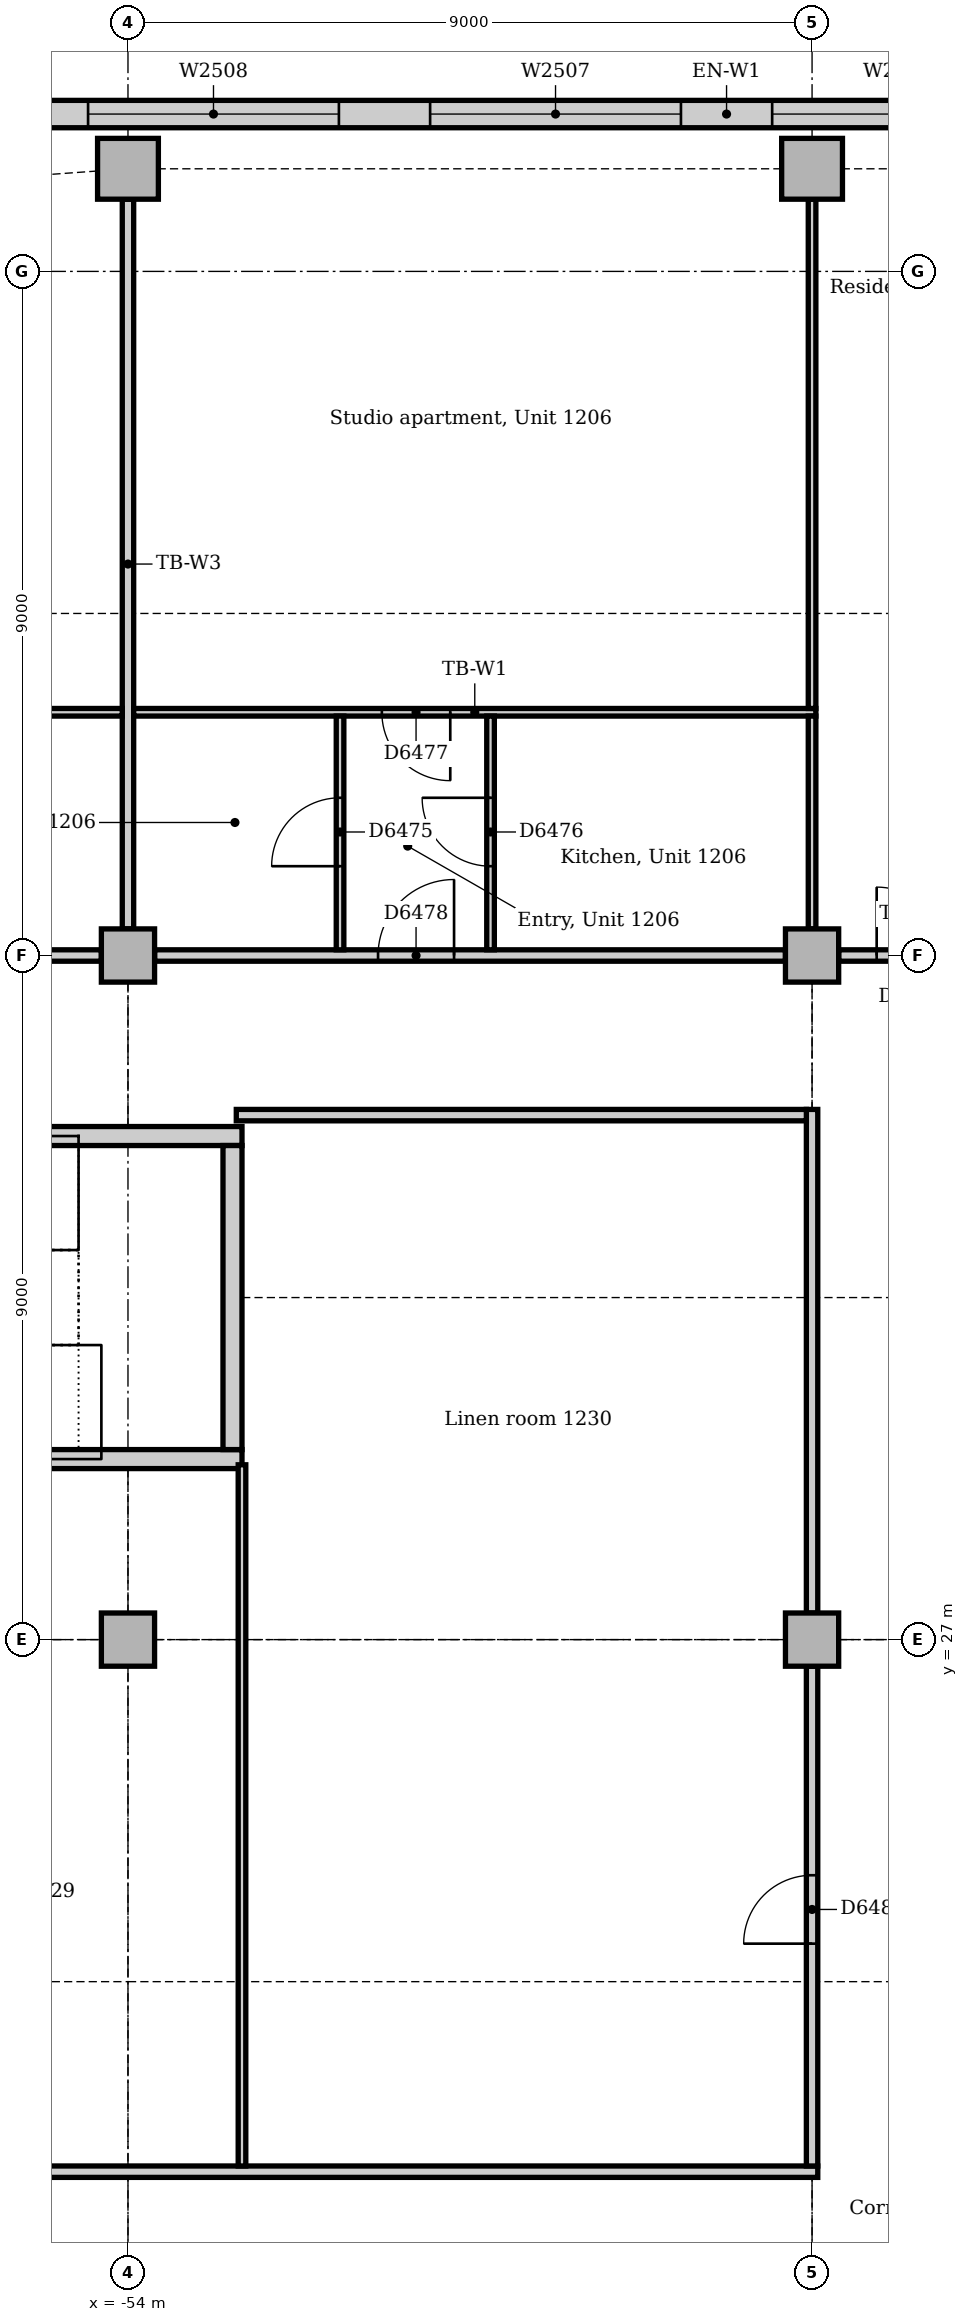
"""IFC4 building model, lengths in metres.
Left out: names, types, materials, properties, quantities, classifications, styles, units other than length and angle.
Written with IfcOpenShell. Run it as: python <this file> out.ifc"""

import sys

from ifc_helpers import new_model, si_unit, direction, frame, frame_2d, origin, origin_2d, place, context, subcontext, project, spatial, rectangle, extrude, element, fill, save


model = new_model("IFC4")
c1 = context("Model", 3, precision=1e-05, world=origin(), true_north=direction((0.0, 1.0)))
c2 = subcontext(c1, "Body", "Model", "MODEL_VIEW")
j1 = project(units=[si_unit("LENGTHUNIT", "METRE"), si_unit("PLANEANGLEUNIT", "RADIAN")], contexts=[c1])
p1 = place(None, origin())
s1 = spatial("IfcSite", under=j1, at=p1, CompositionType="ELEMENT")
p2 = place(p1, origin())
s2 = spatial("IfcBuilding", under=s1, at=p2, CompositionType="ELEMENT")
p3 = place(p2, frame((0.0, 0.0, 55.0)))
s3 = spatial("IfcBuildingStorey", under=s2, at=p3, CompositionType="ELEMENT", Elevation=55.0)
p4 = place(p3, frame((-60.0, 29.375, 0.0), z_axis=(0.0, 0.0, 1.0), x_axis=(1.0, 0.0, 0.0)))
e1 = element("IfcWall", 1, at=p4, inside=s3, PredefinedType="SOLIDWALL", context=c2, shape_type="SweptSolid", body=[
    extrude(rectangle(XDim=7.5, YDim=0.25, at=frame_2d((3.75, 0.0))), origin(), (0.0, 0.0, 1.0), 4.0),
])
p5 = place(p3, frame((-52.5, 33.625, 0.0), z_axis=(0.0, 0.0, 1.0), x_axis=(-1.0, 0.0, 0.0)))
e2 = element("IfcWall", 2, at=p5, inside=s3, PredefinedType="SOLIDWALL", context=c2, shape_type="SweptSolid", body=[
    extrude(rectangle(XDim=7.5, YDim=0.25, at=frame_2d((3.75, 0.0))), origin(), (0.0, 0.0, 1.0), 4.0),
])
p6 = place(p5, frame((6.0, 0.0, 0.0)))
e3 = element("IfcOpeningElement", 3, at=p6, cuts=e2, PredefinedType="OPENING", context=c2, shape_type="SweptSolid", body=[
    extrude(rectangle(XDim=1.0, YDim=2.1, at=frame_2d((0.5, 1.05))), frame((0.0, 0.135, 0.0), z_axis=(0.0, -1.0, 0.0), x_axis=(1.0, 0.0, 0.0)), (0.0, 0.0, 1.0), 0.27),
])
p7 = place(p3, frame((-52.625, 29.5, 0.0), z_axis=(0.0, 0.0, 1.0), x_axis=(0.0, 1.0, 0.0)))
e4 = element("IfcWall", 4, at=p7, inside=s3, PredefinedType="SOLIDWALL", context=c2, shape_type="SweptSolid", body=[
    extrude(rectangle(XDim=4.0, YDim=0.25, at=frame_2d((2.0, 0.0))), origin(), (0.0, 0.0, 1.0), 4.0),
])
for number, where, z_axis, x_axis in (
    (5, (-54.0, 46.35, 0.0), (0.0, 0.0, 1.0), (1.0, 0.0, 0.0)),
    (6, (-45.0, 46.35, 0.0), (0.0, 0.0, 1.0), (1.0, 0.0, 0.0)),
):
    element("IfcColumn", number, at=place(p3, frame(where, z_axis=z_axis, x_axis=x_axis)), inside=s3, PredefinedType="COLUMN", context=c2, shape_type="SweptSolid", body=[
        extrude(rectangle(XDim=0.8, YDim=0.8, at=origin_2d()), origin(), (0.0, 0.0, 1.0), 3.85),
    ])
for number, where, z_axis, x_axis in (
    (7, (-54.0, 27.0, 0.0), (0.0, 0.0, 1.0), (1.0, 0.0, 0.0)),
    (8, (-54.0, 36.0, 0.0), (0.0, 0.0, 1.0), (1.0, 0.0, 0.0)),
    (9, (-45.0, 27.0, 0.0), (0.0, 0.0, 1.0), (1.0, 0.0, 0.0)),
    (10, (-45.0, 36.0, 0.0), (0.0, 0.0, 1.0), (1.0, 0.0, 0.0)),
):
    element("IfcColumn", number, at=place(p3, frame(where, z_axis=z_axis, x_axis=x_axis)), inside=s3, PredefinedType="COLUMN", context=c2, shape_type="SweptSolid", body=[
        extrude(rectangle(XDim=0.7, YDim=0.7, at=origin_2d()), origin(), (0.0, 0.0, 1.0), 3.85),
    ])
p8 = place(p3, frame((-31.243, 47.07, 0.0), z_axis=(0.0, 0.0, 1.0), x_axis=(-1.0, 0.0, 0.0)))
e11 = element("IfcWall", 11, at=p8, inside=s3, PredefinedType="STANDARD", context=c2, shape_type="SweptSolid", body=[
    extrude(rectangle(XDim=29.765, YDim=0.36, at=frame_2d((14.882, 0.0))), origin(), (0.0, 0.0, 1.0), 3.85),
])
p9 = place(p8, frame((1.982, 0.0, 0.9)))
e12 = element("IfcOpeningElement", 12, at=p9, cuts=e11, PredefinedType="OPENING", context=c2, shape_type="SweptSolid", body=[
    extrude(rectangle(XDim=3.3, YDim=1.6, at=frame_2d((1.65, 0.8))), frame((0.0, 0.19, 0.0), z_axis=(0.0, -1.0, 0.0), x_axis=(1.0, 0.0, 0.0)), (0.0, 0.0, 1.0), 0.38),
])
p10 = place(p8, frame((6.482, 0.0, 0.9)))
e13 = element("IfcOpeningElement", 13, at=p10, cuts=e11, PredefinedType="OPENING", context=c2, shape_type="SweptSolid", body=[
    extrude(rectangle(XDim=3.3, YDim=1.6, at=frame_2d((1.65, 0.8))), frame((0.0, 0.19, 0.0), z_axis=(0.0, -1.0, 0.0), x_axis=(1.0, 0.0, 0.0)), (0.0, 0.0, 1.0), 0.38),
])
p11 = place(p8, frame((10.982, 0.0, 0.9)))
e14 = element("IfcOpeningElement", 14, at=p11, cuts=e11, PredefinedType="OPENING", context=c2, shape_type="SweptSolid", body=[
    extrude(rectangle(XDim=3.3, YDim=1.6, at=frame_2d((1.65, 0.8))), frame((0.0, 0.19, 0.0), z_axis=(0.0, -1.0, 0.0), x_axis=(1.0, 0.0, 0.0)), (0.0, 0.0, 1.0), 0.38),
])
p12 = place(p8, frame((15.482, 0.0, 0.9)))
e15 = element("IfcOpeningElement", 15, at=p12, cuts=e11, PredefinedType="OPENING", context=c2, shape_type="SweptSolid", body=[
    extrude(rectangle(XDim=3.3, YDim=1.6, at=frame_2d((1.65, 0.8))), frame((0.0, 0.19, 0.0), z_axis=(0.0, -1.0, 0.0), x_axis=(1.0, 0.0, 0.0)), (0.0, 0.0, 1.0), 0.38),
])
p13 = place(p8, frame((19.982, 0.0, 0.9)))
e16 = element("IfcOpeningElement", 16, at=p13, cuts=e11, PredefinedType="OPENING", context=c2, shape_type="SweptSolid", body=[
    extrude(rectangle(XDim=3.3, YDim=1.6, at=frame_2d((1.65, 0.8))), frame((0.0, 0.19, 0.0), z_axis=(0.0, -1.0, 0.0), x_axis=(1.0, 0.0, 0.0)), (0.0, 0.0, 1.0), 0.38),
])
p14 = place(p8, frame((24.482, 0.0, 0.9)))
e17 = element("IfcOpeningElement", 17, at=p14, cuts=e11, PredefinedType="OPENING", context=c2, shape_type="SweptSolid", body=[
    extrude(rectangle(XDim=3.3, YDim=1.6, at=frame_2d((1.65, 0.8))), frame((0.0, 0.19, 0.0), z_axis=(0.0, -1.0, 0.0), x_axis=(1.0, 0.0, 0.0)), (0.0, 0.0, 1.0), 0.38),
])
p15 = place(p3, frame((-44.65, 36.0, 0.0), z_axis=(0.0, 0.0, 1.0), x_axis=(1.0, 0.0, 0.0)))
e18 = element("IfcWall", 18, at=p15, inside=s3, PredefinedType="PARTITIONING", context=c2, shape_type="SweptSolid", body=[
    extrude(rectangle(XDim=1.925, YDim=0.15, at=frame_2d((0.963, 0.0))), origin(), (0.0, 0.0, 1.0), 3.602),
])
p16 = place(p15, frame((0.5, 0.0, 0.0)))
e19 = element("IfcOpeningElement", 19, at=p16, cuts=e18, PredefinedType="OPENING", context=c2, shape_type="SweptSolid", body=[
    extrude(rectangle(XDim=0.9, YDim=2.1, at=frame_2d((0.45, 1.05))), frame((0.0, 0.085, 0.0), z_axis=(0.0, -1.0, 0.0), x_axis=(1.0, 0.0, 0.0)), (0.0, 0.0, 1.0), 0.17),
])
p17 = place(p3, frame((-53.65, 36.0, 0.0), z_axis=(0.0, 0.0, 1.0), x_axis=(1.0, 0.0, 0.0)))
e20 = element("IfcWall", 20, at=p17, inside=s3, PredefinedType="PARTITIONING", context=c2, shape_type="SweptSolid", body=[
    extrude(rectangle(XDim=8.3, YDim=0.15, at=frame_2d((4.15, 0.0))), origin(), (0.0, 0.0, 1.0), 3.158),
])
p18 = place(p17, frame((2.94, 0.0, 0.0)))
e21 = element("IfcOpeningElement", 21, at=p18, cuts=e20, PredefinedType="OPENING", context=c2, shape_type="SweptSolid", body=[
    extrude(rectangle(XDim=1.0, YDim=2.1, at=frame_2d((0.5, 1.05))), frame((0.0, 0.085, 0.0), z_axis=(0.0, -1.0, 0.0), x_axis=(1.0, 0.0, 0.0)), (0.0, 0.0, 1.0), 0.17),
])
p19 = place(p3, frame((-62.6, 36.0, 0.0), z_axis=(0.0, 0.0, 1.0), x_axis=(1.0, 0.0, 0.0)))
e22 = element("IfcWall", 22, at=p19, inside=s3, PredefinedType="PARTITIONING", context=c2, shape_type="SweptSolid", body=[
    extrude(rectangle(XDim=8.25, YDim=0.15, at=frame_2d((4.125, 0.0))), origin(), (0.0, 0.0, 1.0), 3.158),
])
p20 = place(p19, frame((1.786, 0.0, 0.0)))
e23 = element("IfcOpeningElement", 23, at=p20, cuts=e22, PredefinedType="OPENING", context=c2, shape_type="SweptSolid", body=[
    extrude(rectangle(XDim=1.0, YDim=2.1, at=frame_2d((0.5, 1.05))), frame((0.0, 0.085, 0.0), z_axis=(0.0, -1.0, 0.0), x_axis=(1.0, 0.0, 0.0)), (0.0, 0.0, 1.0), 0.17),
])
p21 = place(p3, frame((-64.89, 20.0, 0.0), z_axis=(0.0, 0.0, 1.0), x_axis=(1.0, 0.0, 0.0)))
e24 = element("IfcWall", 24, at=p21, inside=s3, PredefinedType="PARTITIONING", context=c2, shape_type="SweptSolid", body=[
    extrude(rectangle(XDim=19.965, YDim=0.15, at=frame_2d((9.982, 0.0))), origin(), (0.0, 0.0, 1.0), 3.85),
])
p22 = place(p21, frame((2.05, 0.0, 0.0)))
e25 = element("IfcOpeningElement", 25, at=p22, cuts=e24, PredefinedType="OPENING", context=c2, shape_type="SweptSolid", body=[
    extrude(rectangle(XDim=0.9, YDim=2.1, at=frame_2d((0.45, 1.05))), frame((0.0, 0.085, 0.0), z_axis=(0.0, -1.0, 0.0), x_axis=(1.0, 0.0, 0.0)), (0.0, 0.0, 1.0), 0.17),
])
p23 = place(p21, frame((8.19, 0.0, 0.0)))
e26 = element("IfcOpeningElement", 26, at=p23, cuts=e24, PredefinedType="OPENING", context=c2, shape_type="SweptSolid", body=[
    extrude(rectangle(XDim=0.9, YDim=2.1, at=frame_2d((0.45, 1.05))), frame((0.0, 0.085, 0.0), z_axis=(0.0, -1.0, 0.0), x_axis=(1.0, 0.0, 0.0)), (0.0, 0.0, 1.0), 0.17),
])
p24 = place(p3, frame((-45.0, 20.075, 0.0), z_axis=(0.0, 0.0, 1.0), x_axis=(0.0, 1.0, 0.0)))
e27 = element("IfcWall", 27, at=p24, inside=s3, PredefinedType="PARTITIONING", context=c2, shape_type="SweptSolid", body=[
    extrude(rectangle(XDim=6.575, YDim=0.15, at=frame_2d((3.288, 0.0))), origin(), (0.0, 0.0, 1.0), 3.256),
])
p25 = place(p24, frame((2.925, 0.0, 0.0)))
e28 = element("IfcOpeningElement", 28, at=p25, cuts=e27, PredefinedType="OPENING", context=c2, shape_type="SweptSolid", body=[
    extrude(rectangle(XDim=0.9, YDim=2.1, at=frame_2d((0.45, 1.05))), frame((0.0, 0.085, 0.0), z_axis=(0.0, -1.0, 0.0), x_axis=(1.0, 0.0, 0.0)), (0.0, 0.0, 1.0), 0.17),
])
p26 = place(p3, frame((-45.0, 27.35, 0.0), z_axis=(0.0, 0.0, 1.0), x_axis=(0.0, 1.0, 0.0)))
e29 = element("IfcWall", 29, at=p26, inside=s3, PredefinedType="PARTITIONING", context=c2, shape_type="SweptSolid", body=[
    extrude(rectangle(XDim=6.625, YDim=0.15, at=frame_2d((3.312, 0.0))), origin(), (0.0, 0.0, 1.0), 3.256),
])
p27 = place(p3, frame((-52.575, 33.9, 0.0), z_axis=(0.0, 0.0, 1.0), x_axis=(1.0, 0.0, 0.0)))
e30 = element("IfcWall", 30, at=p27, inside=s3, PredefinedType="PARTITIONING", context=c2, shape_type="SweptSolid", body=[
    extrude(rectangle(XDim=7.5, YDim=0.15, at=frame_2d((3.75, 0.0))), origin(), (0.0, 0.0, 1.0), 3.85),
])
p28 = place(p3, frame((-54.0, 36.35, 0.0), z_axis=(0.0, 0.0, 1.0), x_axis=(0.0, 1.0, 0.0)))
e31 = element("IfcWall", 31, at=p28, inside=s3, PredefinedType="PARTITIONING", context=c2, shape_type="SweptSolid", body=[
    extrude(rectangle(XDim=9.6, YDim=0.15, at=frame_2d((4.8, 0.0))), origin(), (0.0, 0.0, 1.0), 3.256),
])
p29 = place(p3, frame((-53.925, 39.2, 0.0), z_axis=(0.0, 0.0, 1.0), x_axis=(1.0, 0.0, 0.0)))
e32 = element("IfcWall", 32, at=p29, inside=s3, PredefinedType="PARTITIONING", context=c2, shape_type="SweptSolid", body=[
    extrude(rectangle(XDim=8.975, YDim=0.1, at=frame_2d((4.487, 0.0))), origin(), (0.0, 0.0, 1.0), 3.85),
])
p30 = place(p29, frame((3.265, 0.0, 0.0)))
e33 = element("IfcOpeningElement", 33, at=p30, cuts=e32, PredefinedType="OPENING", context=c2, shape_type="SweptSolid", body=[
    extrude(rectangle(XDim=0.9, YDim=2.1, at=frame_2d((0.45, 1.05))), frame((0.0, 0.06, 0.0), z_axis=(0.0, -1.0, 0.0), x_axis=(1.0, 0.0, 0.0)), (0.0, 0.0, 1.0), 0.12),
])
p31 = place(p3, frame((-64.89, 39.2, 0.0), z_axis=(0.0, 0.0, 1.0), x_axis=(1.0, 0.0, 0.0)))
e34 = element("IfcWall", 34, at=p31, inside=s3, PredefinedType="PARTITIONING", context=c2, shape_type="SweptSolid", body=[
    extrude(rectangle(XDim=10.815, YDim=0.1, at=frame_2d((5.407, 0.0))), origin(), (0.0, 0.0, 1.0), 3.85),
])
p32 = place(p31, frame((4.126, 0.0, 0.0)))
e35 = element("IfcOpeningElement", 35, at=p32, cuts=e34, PredefinedType="OPENING", context=c2, shape_type="SweptSolid", body=[
    extrude(rectangle(XDim=0.9, YDim=2.1, at=frame_2d((0.45, 1.05))), frame((0.0, 0.06, 0.0), z_axis=(0.0, -1.0, 0.0), x_axis=(1.0, 0.0, 0.0)), (0.0, 0.0, 1.0), 0.12),
])
p33 = place(p3, frame((-45.0, 39.25, 0.0), z_axis=(0.0, 0.0, 1.0), x_axis=(0.0, 1.0, 0.0)))
e36 = element("IfcWall", 36, at=p33, inside=s3, PredefinedType="PARTITIONING", context=c2, shape_type="SweptSolid", body=[
    extrude(rectangle(XDim=6.7, YDim=0.1, at=frame_2d((3.35, 0.0))), origin(), (0.0, 0.0, 1.0), 3.256),
])
p34 = place(p3, frame((-45.0, 36.35, 0.0), z_axis=(0.0, 0.0, 1.0), x_axis=(0.0, 1.0, 0.0)))
e37 = element("IfcWall", 37, at=p34, inside=s3, PredefinedType="PARTITIONING", context=c2, shape_type="SweptSolid", body=[
    extrude(rectangle(XDim=2.8, YDim=0.1, at=frame_2d((1.4, 0.0))), origin(), (0.0, 0.0, 1.0), 3.256),
])
p35 = place(p3, frame((-52.5, 20.075, 0.0), z_axis=(0.0, 0.0, 1.0), x_axis=(0.0, 1.0, 0.0)))
e38 = element("IfcWall", 38, at=p35, inside=s3, PredefinedType="PARTITIONING", context=c2, shape_type="SweptSolid", body=[
    extrude(rectangle(XDim=9.225, YDim=0.1, at=frame_2d((4.612, 0.0))), origin(), (0.0, 0.0, 1.0), 3.85),
])
p36 = place(p3, frame((-51.21, 36.075, 0.0), z_axis=(0.0, 0.0, 1.0), x_axis=(0.0, 1.0, 0.0)))
e39 = element("IfcWall", 39, at=p36, inside=s3, PredefinedType="PARTITIONING", context=c2, shape_type="SweptSolid", body=[
    extrude(rectangle(XDim=3.075, YDim=0.1, at=frame_2d((1.538, 0.0))), origin(), (0.0, 0.0, 1.0), 3.85),
])
p37 = place(p36, frame((1.1, 0.0, 0.0)))
e40 = element("IfcOpeningElement", 40, at=p37, cuts=e39, PredefinedType="OPENING", context=c2, shape_type="SweptSolid", body=[
    extrude(rectangle(XDim=0.9, YDim=2.1, at=frame_2d((0.45, 1.05))), frame((0.0, 0.06, 0.0), z_axis=(0.0, -1.0, 0.0), x_axis=(1.0, 0.0, 0.0)), (0.0, 0.0, 1.0), 0.12),
])
p38 = place(p3, frame((-49.23, 36.075, 0.0), z_axis=(0.0, 0.0, 1.0), x_axis=(0.0, 1.0, 0.0)))
e41 = element("IfcWall", 41, at=p38, inside=s3, PredefinedType="PARTITIONING", context=c2, shape_type="SweptSolid", body=[
    extrude(rectangle(XDim=3.075, YDim=0.1, at=frame_2d((1.538, 0.0))), origin(), (0.0, 0.0, 1.0), 3.85),
])
p39 = place(p38, frame((1.1, 0.0, 0.0)))
e42 = element("IfcOpeningElement", 42, at=p39, cuts=e41, PredefinedType="OPENING", context=c2, shape_type="SweptSolid", body=[
    extrude(rectangle(XDim=0.9, YDim=2.1, at=frame_2d((0.45, 1.05))), frame((0.0, 0.06, 0.0), z_axis=(0.0, -1.0, 0.0), x_axis=(1.0, 0.0, 0.0)), (0.0, 0.0, 1.0), 0.12),
])
p40 = place(p11, origin())
e43 = element("IfcWindow", 43, at=p40, inside=s3, PartitioningType="SINGLE_PANEL", PredefinedType="WINDOW", context=c2, shape_type="SweptSolid", body=[
    extrude(rectangle(XDim=3.3, YDim=1.6, at=frame_2d((1.65, 0.8))), frame((0.0, 0.13, 0.0), z_axis=(0.0, -1.0, 0.0), x_axis=(1.0, 0.0, 0.0)), (0.0, 0.0, 1.0), 0.06),
])
fill(e14, e43)
p41 = place(p12, origin())
e44 = element("IfcWindow", 44, at=p41, inside=s3, PartitioningType="SINGLE_PANEL", PredefinedType="WINDOW", context=c2, shape_type="SweptSolid", body=[
    extrude(rectangle(XDim=3.3, YDim=1.6, at=frame_2d((1.65, 0.8))), frame((0.0, 0.13, 0.0), z_axis=(0.0, -1.0, 0.0), x_axis=(1.0, 0.0, 0.0)), (0.0, 0.0, 1.0), 0.06),
])
fill(e15, e44)
p42 = place(p13, origin())
e45 = element("IfcWindow", 45, at=p42, inside=s3, PartitioningType="SINGLE_PANEL", PredefinedType="WINDOW", context=c2, shape_type="SweptSolid", body=[
    extrude(rectangle(XDim=3.3, YDim=1.6, at=frame_2d((1.65, 0.8))), frame((0.0, 0.13, 0.0), z_axis=(0.0, -1.0, 0.0), x_axis=(1.0, 0.0, 0.0)), (0.0, 0.0, 1.0), 0.06),
])
fill(e16, e45)
p43 = place(p16, origin())
e46 = element("IfcDoor", 46, at=p43, inside=s3, OperationType="SINGLE_SWING_LEFT", PredefinedType="DOOR", context=c2, shape_type="SweptSolid", body=[
    extrude(rectangle(XDim=0.9, YDim=2.1, at=frame_2d((0.45, 1.05))), frame((0.0, 0.025, 0.0), z_axis=(0.0, -1.0, 0.0), x_axis=(1.0, 0.0, 0.0)), (0.0, 0.0, 1.0), 0.05),
])
fill(e19, e46)
p44 = place(p37, origin())
e47 = element("IfcDoor", 47, at=p44, inside=s3, OperationType="SINGLE_SWING_LEFT", PredefinedType="DOOR", context=c2, shape_type="SweptSolid", body=[
    extrude(rectangle(XDim=0.9, YDim=2.1, at=frame_2d((0.45, 1.05))), frame((0.0, 0.025, 0.0), z_axis=(0.0, -1.0, 0.0), x_axis=(1.0, 0.0, 0.0)), (0.0, 0.0, 1.0), 0.05),
])
fill(e40, e47)
p45 = place(p39, origin())
e48 = element("IfcDoor", 48, at=p45, inside=s3, OperationType="SINGLE_SWING_RIGHT", PredefinedType="DOOR", context=c2, shape_type="SweptSolid", body=[
    extrude(rectangle(XDim=0.9, YDim=2.1, at=frame_2d((0.45, 1.05))), frame((0.0, 0.025, 0.0), z_axis=(0.0, -1.0, 0.0), x_axis=(1.0, 0.0, 0.0)), (0.0, 0.0, 1.0), 0.05),
])
fill(e42, e48)
p46 = place(p30, frame((0.9, 0.0, 0.0), z_axis=(0.0, 0.0, 1.0), x_axis=(-1.0, 0.0, 0.0)))
e49 = element("IfcDoor", 49, at=p46, inside=s3, OperationType="SINGLE_SWING_LEFT", PredefinedType="DOOR", context=c2, shape_type="SweptSolid", body=[
    extrude(rectangle(XDim=0.9, YDim=2.1, at=frame_2d((0.45, 1.05))), frame((0.0, 0.025, 0.0), z_axis=(0.0, -1.0, 0.0), x_axis=(1.0, 0.0, 0.0)), (0.0, 0.0, 1.0), 0.05),
])
fill(e33, e49)
p47 = place(p18, origin())
e50 = element("IfcDoor", 50, at=p47, inside=s3, OperationType="SINGLE_SWING_RIGHT", PredefinedType="DOOR", context=c2, shape_type="SweptSolid", body=[
    extrude(rectangle(XDim=1.0, YDim=2.1, at=frame_2d((0.5, 1.05))), frame((0.0, 0.025, 0.0), z_axis=(0.0, -1.0, 0.0), x_axis=(1.0, 0.0, 0.0)), (0.0, 0.0, 1.0), 0.05),
])
fill(e21, e50)
p48 = place(p25, origin())
e51 = element("IfcDoor", 51, at=p48, inside=s3, OperationType="SINGLE_SWING_LEFT", PredefinedType="DOOR", context=c2, shape_type="SweptSolid", body=[
    extrude(rectangle(XDim=0.9, YDim=2.1, at=frame_2d((0.45, 1.05))), frame((0.0, 0.025, 0.0), z_axis=(0.0, -1.0, 0.0), x_axis=(1.0, 0.0, 0.0)), (0.0, 0.0, 1.0), 0.05),
])
fill(e28, e51)
save(model, sys.argv[1])
